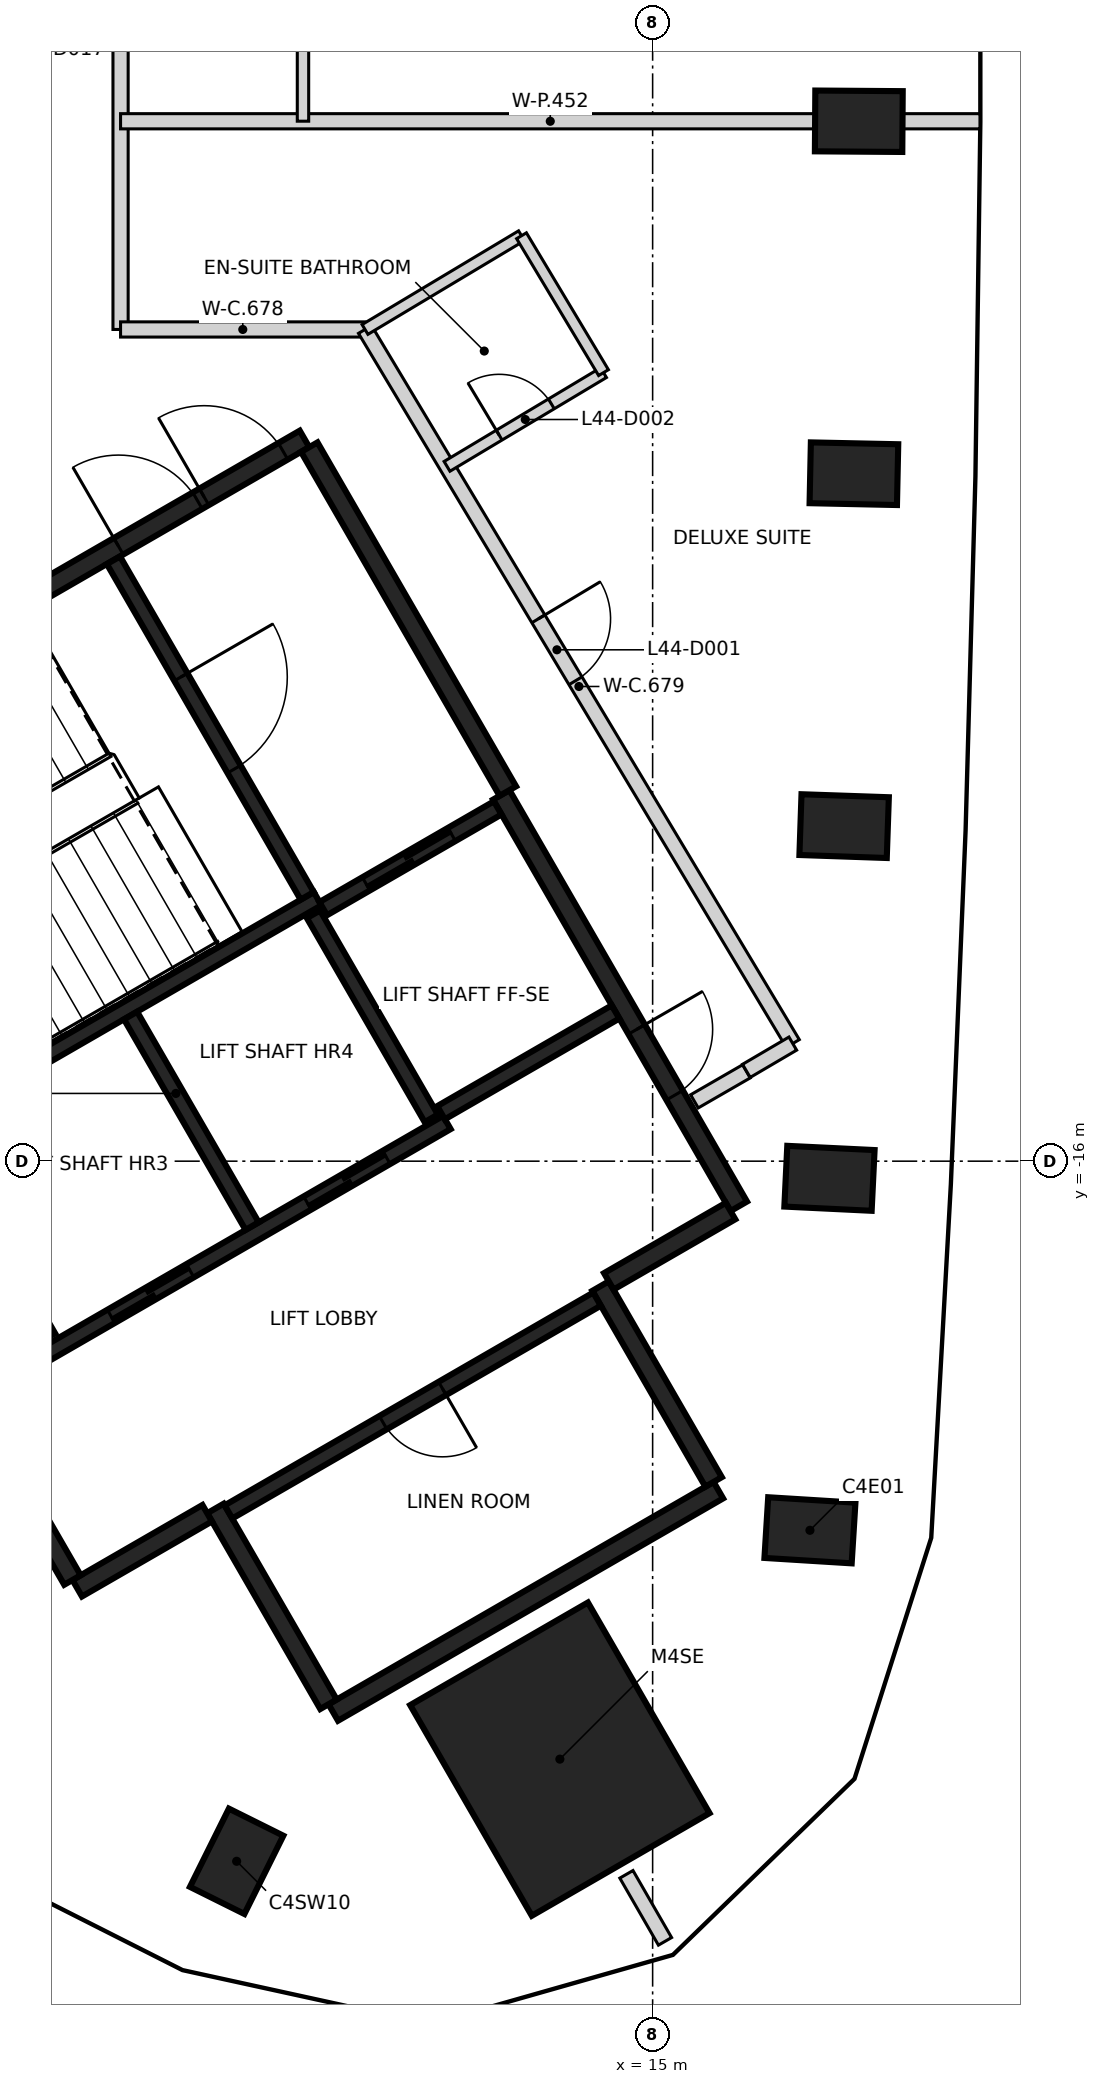
"""IFC4 building model, lengths in metres.
Left out: names, types, materials, properties, quantities, classifications, styles, units other than length and angle.
Written with IfcOpenShell. Run it as: python <this file> out.ifc"""

import sys

from ifc_helpers import new_model, si_unit, direction, frame, frame_2d, origin, origin_2d, place, context, subcontext, project, spatial, rectangle, extrude, element, fill, save


model = new_model("IFC4")
c1 = context("Model", 3, precision=1e-05, world=origin(), true_north=direction((0.0, 1.0)))
c2 = subcontext(c1, "Body", "Model", "MODEL_VIEW")
j1 = project(units=[si_unit("LENGTHUNIT", "METRE"), si_unit("PLANEANGLEUNIT", "RADIAN")], contexts=[c1])
p1 = place(None, origin())
s1 = spatial("IfcSite", under=j1, at=p1, CompositionType="ELEMENT")
p2 = place(p1, origin())
s2 = spatial("IfcBuilding", under=s1, at=p2, CompositionType="ELEMENT")
p3 = place(p2, frame((0.0, 0.0, 179.2)))
s3 = spatial("IfcBuildingStorey", under=s2, at=p3, CompositionType="ELEMENT", Elevation=179.2)
for number, where, z_axis, x_axis in (
    (1, (17.07, -20.856, -0.35), (0.0, 0.0, 1.0), (-0.998, 0.062, 0.0)),
    (2, (17.326, -16.226, -0.35), (0.0, 0.0, 1.0), (-0.999, 0.048, 0.0)),
    (3, (17.519, -11.592, -0.35), (0.0, 0.0, 1.0), (-0.999, 0.034, 0.0)),
    (4, (17.648, -6.956, -0.35), (0.0, 0.0, 1.0), (-1.0, 0.021, 0.0)),
    (5, (17.712, -2.319, -0.35), (0.0, 0.0, 1.0), (-1.0, 0.007, 0.0)),
    (6, (9.527, -25.211, -0.35), (0.0, 0.0, 1.0), (0.445, 0.895, 0.0)),
):
    element("IfcColumn", number, at=place(p3, frame(where, z_axis=z_axis, x_axis=x_axis)), inside=s3, PredefinedType="COLUMN", context=c2, shape_type="SweptSolid", body=[
        extrude(rectangle(XDim=1.15, YDim=0.8, at=origin_2d()), origin(), (0.0, 0.0, 1.0), 3.6),
    ])
p4 = place(p3, frame((13.78, -23.867, -0.35), z_axis=(0.0, 0.0, 1.0), x_axis=(-0.5, 0.866025403784, 0.0)))
e7 = element("IfcColumn", 7, at=p4, inside=s3, PredefinedType="COLUMN", context=c2, shape_type="SweptSolid", body=[
    extrude(rectangle(XDim=3.2, YDim=2.7, at=origin_2d()), origin(), (0.0, 0.0, 1.0), 3.6),
])
p5 = place(p3, frame((0.417, -12.273, 0.0), z_axis=(0.0, 0.0, 1.0), x_axis=(0.866021906294, 0.500006057782, 0.0)))
e8 = element("IfcWall", 8, at=p5, inside=s3, PredefinedType="SHEAR", context=c2, shape_type="SweptSolid", body=[
    extrude(rectangle(XDim=11.55, YDim=0.25, at=frame_2d((5.775, 0.0))), origin(), (0.0, 0.0, 1.0), 3.25),
])
p6 = place(p5, frame((10.025, 0.0, 0.0)))
e9 = element("IfcOpeningElement", 9, at=p6, cuts=e8, PredefinedType="OPENING", context=c2, shape_type="SweptSolid", body=[
    extrude(rectangle(XDim=1.2, YDim=2.1, at=frame_2d((0.6, 1.05))), frame((0.0, 0.135, 0.0), z_axis=(0.0, -1.0, 0.0), x_axis=(1.0, 0.0, 0.0)), (0.0, 0.0, 1.0), 0.27),
])
p7 = place(p5, frame((8.725, 0.0, 0.0)))
e10 = element("IfcOpeningElement", 10, at=p7, cuts=e8, PredefinedType="OPENING", context=c2, shape_type="SweptSolid", body=[
    extrude(rectangle(XDim=1.2, YDim=2.1, at=frame_2d((0.6, 1.05))), frame((0.0, 0.135, 0.0), z_axis=(0.0, -1.0, 0.0), x_axis=(1.0, 0.0, 0.0)), (0.0, 0.0, 1.0), 0.27),
])
p8 = place(p3, frame((13.008, -11.181, 0.0), z_axis=(0.0, 0.0, 1.0), x_axis=(0.500004234368, -0.866022959057, 0.0)))
e11 = element("IfcWall", 11, at=p8, inside=s3, PredefinedType="SHEAR", context=c2, shape_type="SweptSolid", body=[
    extrude(rectangle(XDim=6.25, YDim=0.25, at=frame_2d((3.125, 0.0))), origin(), (0.0, 0.0, 1.0), 3.25),
])
p9 = place(p8, frame((3.563, 0.0, 0.0)))
e12 = element("IfcOpeningElement", 12, at=p9, cuts=e11, PredefinedType="OPENING", context=c2, shape_type="SweptSolid", body=[
    extrude(rectangle(XDim=1.0, YDim=2.1, at=frame_2d((0.5, 1.05))), frame((0.0, 0.135, 0.0), z_axis=(0.0, -1.0, 0.0), x_axis=(1.0, 0.0, 0.0)), (0.0, 0.0, 1.0), 0.27),
])
p10 = place(p3, frame((15.865, -20.328, 0.0), z_axis=(0.0, 0.0, 1.0), x_axis=(-0.86602852612, -0.499994591916, 0.0)))
e13 = element("IfcWall", 13, at=p10, inside=s3, PredefinedType="SHEAR", context=c2, shape_type="SweptSolid", body=[
    extrude(rectangle(XDim=5.85, YDim=0.25, at=frame_2d((2.925, 0.0))), origin(), (0.0, 0.0, 1.0), 3.25),
])
p11 = place(p3, frame((10.483, -6.606, 0.0), z_axis=(0.0, 0.0, 1.0), x_axis=(0.49999885962, -0.866026062182, 0.0)))
e14 = element("IfcWall", 14, at=p11, inside=s3, PredefinedType="SHEAR", context=c2, shape_type="SweptSolid", body=[
    extrude(rectangle(XDim=5.225, YDim=0.25, at=frame_2d((2.612, 0.0))), origin(), (0.0, 0.0, 1.0), 3.25),
])
p12 = place(p3, frame((7.031, -18.327, 0.0), z_axis=(0.0, 0.0, 1.0), x_axis=(-0.499971222258, 0.866042017984, 0.0)))
e15 = element("IfcWall", 15, at=p12, inside=s3, PredefinedType="SHEAR", context=c2, shape_type="SweptSolid", body=[
    extrude(rectangle(XDim=3.2, YDim=0.25, at=frame_2d((1.6, 0.0))), origin(), (0.0, 0.0, 1.0), 3.25),
])
for number, where, z_axis, x_axis in (
    (16, (14.315, -17.644, 0.0), (0.0, 0.0, 1.0), (0.5, -0.866, 0.0)),
    (17, (10.736, -23.145, 0.0), (0.0, 0.0, 1.0), (-0.5, 0.866, 0.0)),
):
    element("IfcWall", number, at=place(p3, frame(where, z_axis=z_axis, x_axis=x_axis)), inside=s3, PredefinedType="SHEAR", context=c2, shape_type="SweptSolid", body=[
        extrude(rectangle(XDim=2.974, YDim=0.25, at=frame_2d((1.487, 0.0))), origin(), (0.0, 0.0, 1.0), 3.25),
    ])
p13 = place(p3, frame((9.14, -20.631, 0.0), z_axis=(0.0, 0.0, 1.0), x_axis=(-0.866043531843, -0.499968599967, 0.0)))
e18 = element("IfcWall", 18, at=p13, inside=s3, PredefinedType="SHEAR", context=c2, shape_type="SweptSolid", body=[
    extrude(rectangle(XDim=1.975, YDim=0.25, at=frame_2d((0.987, 0.0))), origin(), (0.0, 0.0, 1.0), 3.25),
])
p14 = place(p3, frame((16.025, -16.656, 0.0), z_axis=(0.0, 0.0, 1.0), x_axis=(-0.866016279763, -0.500015802937, 0.0)))
e19 = element("IfcWall", 19, at=p14, inside=s3, PredefinedType="SHEAR", context=c2, shape_type="SweptSolid", body=[
    extrude(rectangle(XDim=1.849, YDim=0.25, at=frame_2d((0.925, 0.0))), origin(), (0.0, 0.0, 1.0), 3.25),
])
p15 = place(p3, frame((7.367, -21.51, 0.0), z_axis=(0.0, 0.0, 1.0), x_axis=(-0.499983108224, 0.866035156036, 0.0)))
e20 = element("IfcWall", 20, at=p15, inside=s3, PredefinedType="SHEAR", context=c2, shape_type="SweptSolid", body=[
    extrude(rectangle(XDim=1.865, YDim=0.25, at=frame_2d((0.932, 0.0))), origin(), (0.0, 0.0, 1.0), 3.25),
])
p16 = place(p3, frame((5.526, -15.472, 0.0), z_axis=(0.0, 0.0, 1.0), x_axis=(0.866041752167, 0.499971682701, 0.0)))
e21 = element("IfcWall", 21, at=p16, inside=s3, PredefinedType="SHEAR", context=c2, shape_type="SweptSolid", body=[
    extrude(rectangle(XDim=5.851, YDim=0.2, at=frame_2d((2.925, 0.0))), origin(), (0.0, 0.0, 1.0), 3.25),
])
p17 = place(p3, frame((7.01, -18.542, 0.0), z_axis=(0.0, 0.0, 1.0), x_axis=(0.866030299012, 0.499991521122, 0.0)))
e22 = element("IfcWall", 22, at=p17, inside=s3, PredefinedType="SHEAR", context=c2, shape_type="SweptSolid", body=[
    extrude(rectangle(XDim=6.1, YDim=0.2, at=frame_2d((3.05, 0.0))), origin(), (0.0, 0.0, 1.0), 3.25),
])
p18 = place(p17, frame((1.0, 0.0, 0.0)))
e23 = element("IfcOpeningElement", 23, at=p18, cuts=e22, PredefinedType="OPENING", context=c2, shape_type="SweptSolid", body=[
    extrude(rectangle(XDim=1.2, YDim=2.1, at=frame_2d((0.6, 1.05))), frame((0.0, 0.11, 0.0), z_axis=(0.0, -1.0, 0.0), x_axis=(1.0, 0.0, 0.0)), (0.0, 0.0, 1.0), 0.22),
])
p19 = place(p17, frame((3.982, 0.0, 0.0)))
e24 = element("IfcOpeningElement", 24, at=p19, cuts=e22, PredefinedType="OPENING", context=c2, shape_type="SweptSolid", body=[
    extrude(rectangle(XDim=1.2, YDim=2.1, at=frame_2d((0.6, 1.05))), frame((0.0, 0.11, 0.0), z_axis=(0.0, -1.0, 0.0), x_axis=(1.0, 0.0, 0.0)), (0.0, 0.0, 1.0), 0.22),
])
p20 = place(p3, frame((14.268, -17.815, 0.0), z_axis=(0.0, 0.0, 1.0), x_axis=(-0.866033794273, -0.499985466966, 0.0)))
e25 = element("IfcWall", 25, at=p20, inside=s3, PredefinedType="SHEAR", context=c2, shape_type="SweptSolid", body=[
    extrude(rectangle(XDim=5.598, YDim=0.2, at=frame_2d((2.799, 0.0))), origin(), (0.0, 0.0, 1.0), 3.25),
])
p21 = place(p20, frame((2.349, 0.0, 0.0)))
e26 = element("IfcOpeningElement", 26, at=p21, cuts=e25, PredefinedType="OPENING", context=c2, shape_type="SweptSolid", body=[
    extrude(rectangle(XDim=0.9, YDim=2.1, at=frame_2d((0.45, 1.05))), frame((0.0, 0.11, 0.0), z_axis=(0.0, -1.0, 0.0), x_axis=(1.0, 0.0, 0.0)), (0.0, 0.0, 1.0), 0.22),
])
p22 = place(p3, frame((7.906, -8.094, 0.0), z_axis=(0.0, 0.0, 1.0), x_axis=(0.500027839223, -0.866009330205, 0.0)))
e27 = element("IfcWall", 27, at=p22, inside=s3, PredefinedType="SHEAR", context=c2, shape_type="SweptSolid", body=[
    extrude(rectangle(XDim=5.098, YDim=0.2, at=frame_2d((2.549, 0.0))), origin(), (0.0, 0.0, 1.0), 3.25),
])
p23 = place(p22, frame((1.774, 0.0, 0.0)))
e28 = element("IfcOpeningElement", 28, at=p23, cuts=e27, PredefinedType="OPENING", context=c2, shape_type="SweptSolid", body=[
    extrude(rectangle(XDim=1.4, YDim=2.1, at=frame_2d((0.7, 1.05))), frame((0.0, 0.11, 0.0), z_axis=(0.0, -1.0, 0.0), x_axis=(1.0, 0.0, 0.0)), (0.0, 0.0, 1.0), 0.22),
])
p24 = place(p3, frame((8.132, -14.084, 0.0), z_axis=(0.0, 0.0, 1.0), x_axis=(0.499997778408, -0.866026686418, 0.0)))
e29 = element("IfcWall", 29, at=p24, inside=s3, PredefinedType="SHEAR", context=c2, shape_type="SweptSolid", body=[
    extrude(rectangle(XDim=3.198, YDim=0.2, at=frame_2d((1.599, 0.0))), origin(), (0.0, 0.0, 1.0), 3.25),
])
p25 = place(p3, frame((12.088, -15.437, 0.0), z_axis=(0.0, 0.0, 1.0), x_axis=(-0.500026960575, 0.86600983753, 0.0)))
e30 = element("IfcWall", 30, at=p25, inside=s3, PredefinedType="SHEAR", context=c2, shape_type="SweptSolid", body=[
    extrude(rectangle(XDim=3.1, YDim=0.2, at=frame_2d((1.55, 0.0))), origin(), (0.0, 0.0, 1.0), 3.25),
])
p26 = place(p3, frame((10.666, -12.678, 0.0), z_axis=(0.0, 0.0, 1.0), x_axis=(0.866018407898, 0.500012117035, 0.0)))
e31 = element("IfcWall", 31, at=p26, inside=s3, PredefinedType="SHEAR", context=c2, shape_type="SweptSolid", body=[
    extrude(rectangle(XDim=2.651, YDim=0.2, at=frame_2d((1.325, 0.0))), origin(), (0.0, 0.0, 1.0), 3.25),
])
p27 = place(p26, frame((0.652, 0.0, 0.0)))
e32 = element("IfcOpeningElement", 32, at=p27, cuts=e31, PredefinedType="OPENING", context=c2, shape_type="SweptSolid", body=[
    extrude(rectangle(XDim=1.3, YDim=2.1, at=frame_2d((0.65, 1.05))), frame((0.0, 0.11, 0.0), z_axis=(0.0, -1.0, 0.0), x_axis=(1.0, 0.0, 0.0)), (0.0, 0.0, 1.0), 0.22),
])
p28 = place(p3, frame((14.512, -14.037, 0.0), z_axis=(0.0, 0.0, 1.0), x_axis=(-0.866018407898, -0.500012117035, 0.0)))
e33 = element("IfcWall", 33, at=p28, inside=s3, PredefinedType="SHEAR", context=c2, shape_type="SweptSolid", body=[
    extrude(rectangle(XDim=2.651, YDim=0.2, at=frame_2d((1.325, 0.0))), origin(), (0.0, 0.0, 1.0), 3.25),
])
p29 = place(p3, frame((8.0, -5.058, 0.0), z_axis=(0.0, 0.0, 1.0), x_axis=(0.0, 1.0, 0.0)))
e34 = element("IfcWall", 34, at=p29, inside=s3, PredefinedType="PARTITIONING", context=c2, shape_type="SweptSolid", body=[
    extrude(rectangle(XDim=12.74, YDim=0.2, at=frame_2d((6.37, 0.0))), origin(), (0.0, 0.0, 1.0), 3.25),
])
p30 = place(p29, frame((9.508, 0.0, 0.0)))
e35 = element("IfcOpeningElement", 35, at=p30, cuts=e34, PredefinedType="OPENING", context=c2, shape_type="SweptSolid", body=[
    extrude(rectangle(XDim=0.95, YDim=2.1, at=frame_2d((0.475, 1.05))), frame((0.0, 0.11, 0.0), z_axis=(0.0, -1.0, 0.0), x_axis=(1.0, 0.0, 0.0)), (0.0, 0.0, 1.0), 0.22),
])
p31 = place(p3, frame((8.0, -5.058, 0.0), z_axis=(0.0, 0.0, 1.0), x_axis=(1.0, 0.0, 0.0)))
e36 = element("IfcWall", 36, at=p31, inside=s3, PredefinedType="PARTITIONING", context=c2, shape_type="SweptSolid", body=[
    extrude(rectangle(XDim=3.216, YDim=0.2, at=frame_2d((1.608, 0.0))), origin(), (0.0, 0.0, 1.0), 3.25),
])
p32 = place(p3, frame((11.216, -5.058, 0.0), z_axis=(0.0, 0.0, 1.0), x_axis=(0.51393500197, -0.857829128527, 0.0)))
e37 = element("IfcWall", 37, at=p32, inside=s3, PredefinedType="PARTITIONING", context=c2, shape_type="SweptSolid", body=[
    extrude(rectangle(XDim=10.951, YDim=0.2, at=frame_2d((5.475, 0.0))), origin(), (0.0, 0.0, 1.0), 3.25),
])
p33 = place(p32, frame((4.438, 0.0, 0.0)))
e38 = element("IfcOpeningElement", 38, at=p33, cuts=e37, PredefinedType="OPENING", context=c2, shape_type="SweptSolid", body=[
    extrude(rectangle(XDim=0.95, YDim=2.1, at=frame_2d((0.475, 1.05))), frame((0.0, 0.11, 0.0), z_axis=(0.0, -1.0, 0.0), x_axis=(1.0, 0.0, 0.0)), (0.0, 0.0, 1.0), 0.22),
])
p34 = place(p3, frame((15.55, -15.213, 0.0), z_axis=(0.0, 0.0, 1.0), x_axis=(0.865989998118, 0.500061319399, 0.0)))
e39 = element("IfcWall", 39, at=p34, inside=s3, PredefinedType="PARTITIONING", context=c2, shape_type="SweptSolid", body=[
    extrude(rectangle(XDim=0.79, YDim=0.2, at=frame_2d((0.395, 0.0))), origin(), (0.0, 0.0, 1.0), 3.25),
])
p35 = place(p3, frame((16.233, -14.812, 0.0), z_axis=(0.0, 0.0, 1.0), x_axis=(0.862137800155, 0.506673872964, 0.0)))
e40 = element("IfcWall", 40, at=p35, inside=s3, PredefinedType="PARTITIONING", context=c2, shape_type="SweptSolid", body=[
    extrude(rectangle(XDim=0.709, YDim=0.2, at=frame_2d((0.354, 0.0))), origin(), (0.0, 0.0, 1.0), 3.25),
])
p36 = place(p3, frame((8.0, -2.319, 0.0), z_axis=(0.0, 0.0, 1.0), x_axis=(1.0, 0.0, 0.0)))
e41 = element("IfcWall", 41, at=p36, inside=s3, PredefinedType="PARTITIONING", context=c2, shape_type="SweptSolid", body=[
    extrude(rectangle(XDim=11.306, YDim=0.2, at=frame_2d((5.653, 0.0))), origin(), (0.0, 0.0, 1.0), 3.25),
])
p37 = place(p3, frame((14.655, -25.382, 0.0), z_axis=(0.0, 0.0, 1.0), x_axis=(0.49921010478, -0.86648096995, 0.0)))
e42 = element("IfcWall", 42, at=p37, inside=s3, PredefinedType="PARTITIONING", context=c2, shape_type="SweptSolid", body=[
    extrude(rectangle(XDim=1.018, YDim=0.2, at=frame_2d((0.509, 0.0))), origin(), (0.0, 0.0, 1.0), 3.25),
])
p38 = place(p3, frame((10.4, -2.318, 0.0), z_axis=(0.0, 0.0, 1.0), x_axis=(0.0, 1.0, 0.0)))
e43 = element("IfcWall", 43, at=p38, inside=s3, PredefinedType="PARTITIONING", context=c2, shape_type="SweptSolid", body=[
    extrude(rectangle(XDim=2.097, YDim=0.15, at=frame_2d((1.049, 0.0))), origin(), (0.0, 0.0, 1.0), 3.25),
])
p39 = place(p3, frame((11.216, -5.058, 0.0), z_axis=(0.0, 0.0, 1.0), x_axis=(0.85788762415, 0.51383735202, 0.0)))
e44 = element("IfcWall", 44, at=p39, inside=s3, PredefinedType="PARTITIONING", context=c2, shape_type="SweptSolid", body=[
    extrude(rectangle(XDim=2.4, YDim=0.15, at=frame_2d((1.2, 0.0))), origin(), (0.0, 0.0, 1.0), 3.25),
])
p40 = place(p3, frame((12.295, -6.859, 0.0), z_axis=(0.0, 0.0, 1.0), x_axis=(0.857959316897, 0.513717636985, 0.0)))
e45 = element("IfcWall", 45, at=p40, inside=s3, PredefinedType="PARTITIONING", context=c2, shape_type="SweptSolid", body=[
    extrude(rectangle(XDim=2.4, YDim=0.15, at=frame_2d((1.2, 0.0))), origin(), (0.0, 0.0, 1.0), 3.25),
])
p41 = place(p40, frame((0.8, 0.0, 0.0)))
e46 = element("IfcOpeningElement", 46, at=p41, cuts=e45, PredefinedType="OPENING", context=c2, shape_type="SweptSolid", body=[
    extrude(rectangle(XDim=0.8, YDim=2.1, at=frame_2d((0.4, 1.05))), frame((0.0, 0.085, 0.0), z_axis=(0.0, -1.0, 0.0), x_axis=(1.0, 0.0, 0.0)), (0.0, 0.0, 1.0), 0.17),
])
p42 = place(p3, frame((13.275, -3.825, 0.0), z_axis=(0.0, 0.0, 1.0), x_axis=(0.513965548914, -0.857810826773, 0.0)))
e47 = element("IfcWall", 47, at=p42, inside=s3, PredefinedType="PARTITIONING", context=c2, shape_type="SweptSolid", body=[
    extrude(rectangle(XDim=2.1, YDim=0.15, at=frame_2d((1.05, 0.0))), origin(), (0.0, 0.0, 1.0), 3.25),
])
p43 = place(p27, origin())
e48 = element("IfcDoor", 48, at=p43, inside=s3, OperationType="SLIDING_TO_RIGHT", PredefinedType="DOOR", context=c2, shape_type="SweptSolid", body=[
    extrude(rectangle(XDim=1.3, YDim=2.1, at=frame_2d((0.65, 1.05))), frame((0.0, 0.025, 0.0), z_axis=(0.0, -1.0, 0.0), x_axis=(1.0, 0.0, 0.0)), (0.0, 0.0, 1.0), 0.05),
])
fill(e32, e48)
p44 = place(p18, origin())
e49 = element("IfcDoor", 49, at=p44, inside=s3, OperationType="DOUBLE_DOOR_SLIDING", PredefinedType="DOOR", context=c2, shape_type="SweptSolid", body=[
    extrude(rectangle(XDim=1.2, YDim=2.1, at=frame_2d((0.6, 1.05))), frame((0.0, 0.025, 0.0), z_axis=(0.0, -1.0, 0.0), x_axis=(1.0, 0.0, 0.0)), (0.0, 0.0, 1.0), 0.05),
])
fill(e23, e49)
p45 = place(p19, origin())
e50 = element("IfcDoor", 50, at=p45, inside=s3, OperationType="DOUBLE_DOOR_SLIDING", PredefinedType="DOOR", context=c2, shape_type="SweptSolid", body=[
    extrude(rectangle(XDim=1.2, YDim=2.1, at=frame_2d((0.6, 1.05))), frame((0.0, 0.025, 0.0), z_axis=(0.0, -1.0, 0.0), x_axis=(1.0, 0.0, 0.0)), (0.0, 0.0, 1.0), 0.05),
])
fill(e24, e50)
p46 = place(p9, origin())
e51 = element("IfcDoor", 51, at=p46, inside=s3, OperationType="SINGLE_SWING_LEFT", PredefinedType="DOOR", context=c2, shape_type="SweptSolid", body=[
    extrude(rectangle(XDim=1.0, YDim=2.1, at=frame_2d((0.5, 1.05))), frame((0.0, 0.025, 0.0), z_axis=(0.0, -1.0, 0.0), x_axis=(1.0, 0.0, 0.0)), (0.0, 0.0, 1.0), 0.05),
])
fill(e12, e51)
p47 = place(p6, origin())
e52 = element("IfcDoor", 52, at=p47, inside=s3, OperationType="SINGLE_SWING_LEFT", PredefinedType="DOOR", context=c2, shape_type="SweptSolid", body=[
    extrude(rectangle(XDim=1.2, YDim=2.1, at=frame_2d((0.6, 1.05))), frame((0.0, 0.025, 0.0), z_axis=(0.0, -1.0, 0.0), x_axis=(1.0, 0.0, 0.0)), (0.0, 0.0, 1.0), 0.05),
])
fill(e9, e52)
p48 = place(p7, origin())
e53 = element("IfcDoor", 53, at=p48, inside=s3, OperationType="SINGLE_SWING_RIGHT", PredefinedType="DOOR", context=c2, shape_type="SweptSolid", body=[
    extrude(rectangle(XDim=1.2, YDim=2.1, at=frame_2d((0.6, 1.05))), frame((0.0, 0.025, 0.0), z_axis=(0.0, -1.0, 0.0), x_axis=(1.0, 0.0, 0.0)), (0.0, 0.0, 1.0), 0.05),
])
fill(e10, e53)
p49 = place(p23, origin())
e54 = element("IfcDoor", 54, at=p49, inside=s3, OperationType="SINGLE_SWING_RIGHT", PredefinedType="DOOR", context=c2, shape_type="SweptSolid", body=[
    extrude(rectangle(XDim=1.4, YDim=2.1, at=frame_2d((0.7, 1.05))), frame((0.0, 0.025, 0.0), z_axis=(0.0, -1.0, 0.0), x_axis=(1.0, 0.0, 0.0)), (0.0, 0.0, 1.0), 0.05),
])
fill(e28, e54)
p50 = place(p21, origin())
e55 = element("IfcDoor", 55, at=p50, inside=s3, OperationType="SINGLE_SWING_LEFT", PredefinedType="DOOR", context=c2, shape_type="SweptSolid", body=[
    extrude(rectangle(XDim=0.9, YDim=2.1, at=frame_2d((0.45, 1.05))), frame((0.0, 0.025, 0.0), z_axis=(0.0, -1.0, 0.0), x_axis=(1.0, 0.0, 0.0)), (0.0, 0.0, 1.0), 0.05),
])
fill(e26, e55)
p51 = place(p33, origin())
e56 = element("IfcDoor", 56, at=p51, inside=s3, OperationType="SINGLE_SWING_LEFT", PredefinedType="DOOR", context=c2, shape_type="SweptSolid", body=[
    extrude(rectangle(XDim=0.95, YDim=2.1, at=frame_2d((0.475, 1.05))), frame((0.0, 0.025, 0.0), z_axis=(0.0, -1.0, 0.0), x_axis=(1.0, 0.0, 0.0)), (0.0, 0.0, 1.0), 0.05),
])
fill(e38, e56)
p52 = place(p41, frame((0.8, 0.0, 0.0), z_axis=(0.0, 0.0, 1.0), x_axis=(-1.0, 0.0, 0.0)))
e57 = element("IfcDoor", 57, at=p52, inside=s3, OperationType="SINGLE_SWING_LEFT", PredefinedType="DOOR", context=c2, shape_type="SweptSolid", body=[
    extrude(rectangle(XDim=0.8, YDim=2.1, at=frame_2d((0.4, 1.05))), frame((0.0, 0.025, 0.0), z_axis=(0.0, -1.0, 0.0), x_axis=(1.0, 0.0, 0.0)), (0.0, 0.0, 1.0), 0.05),
])
fill(e46, e57)
save(model, sys.argv[1])
